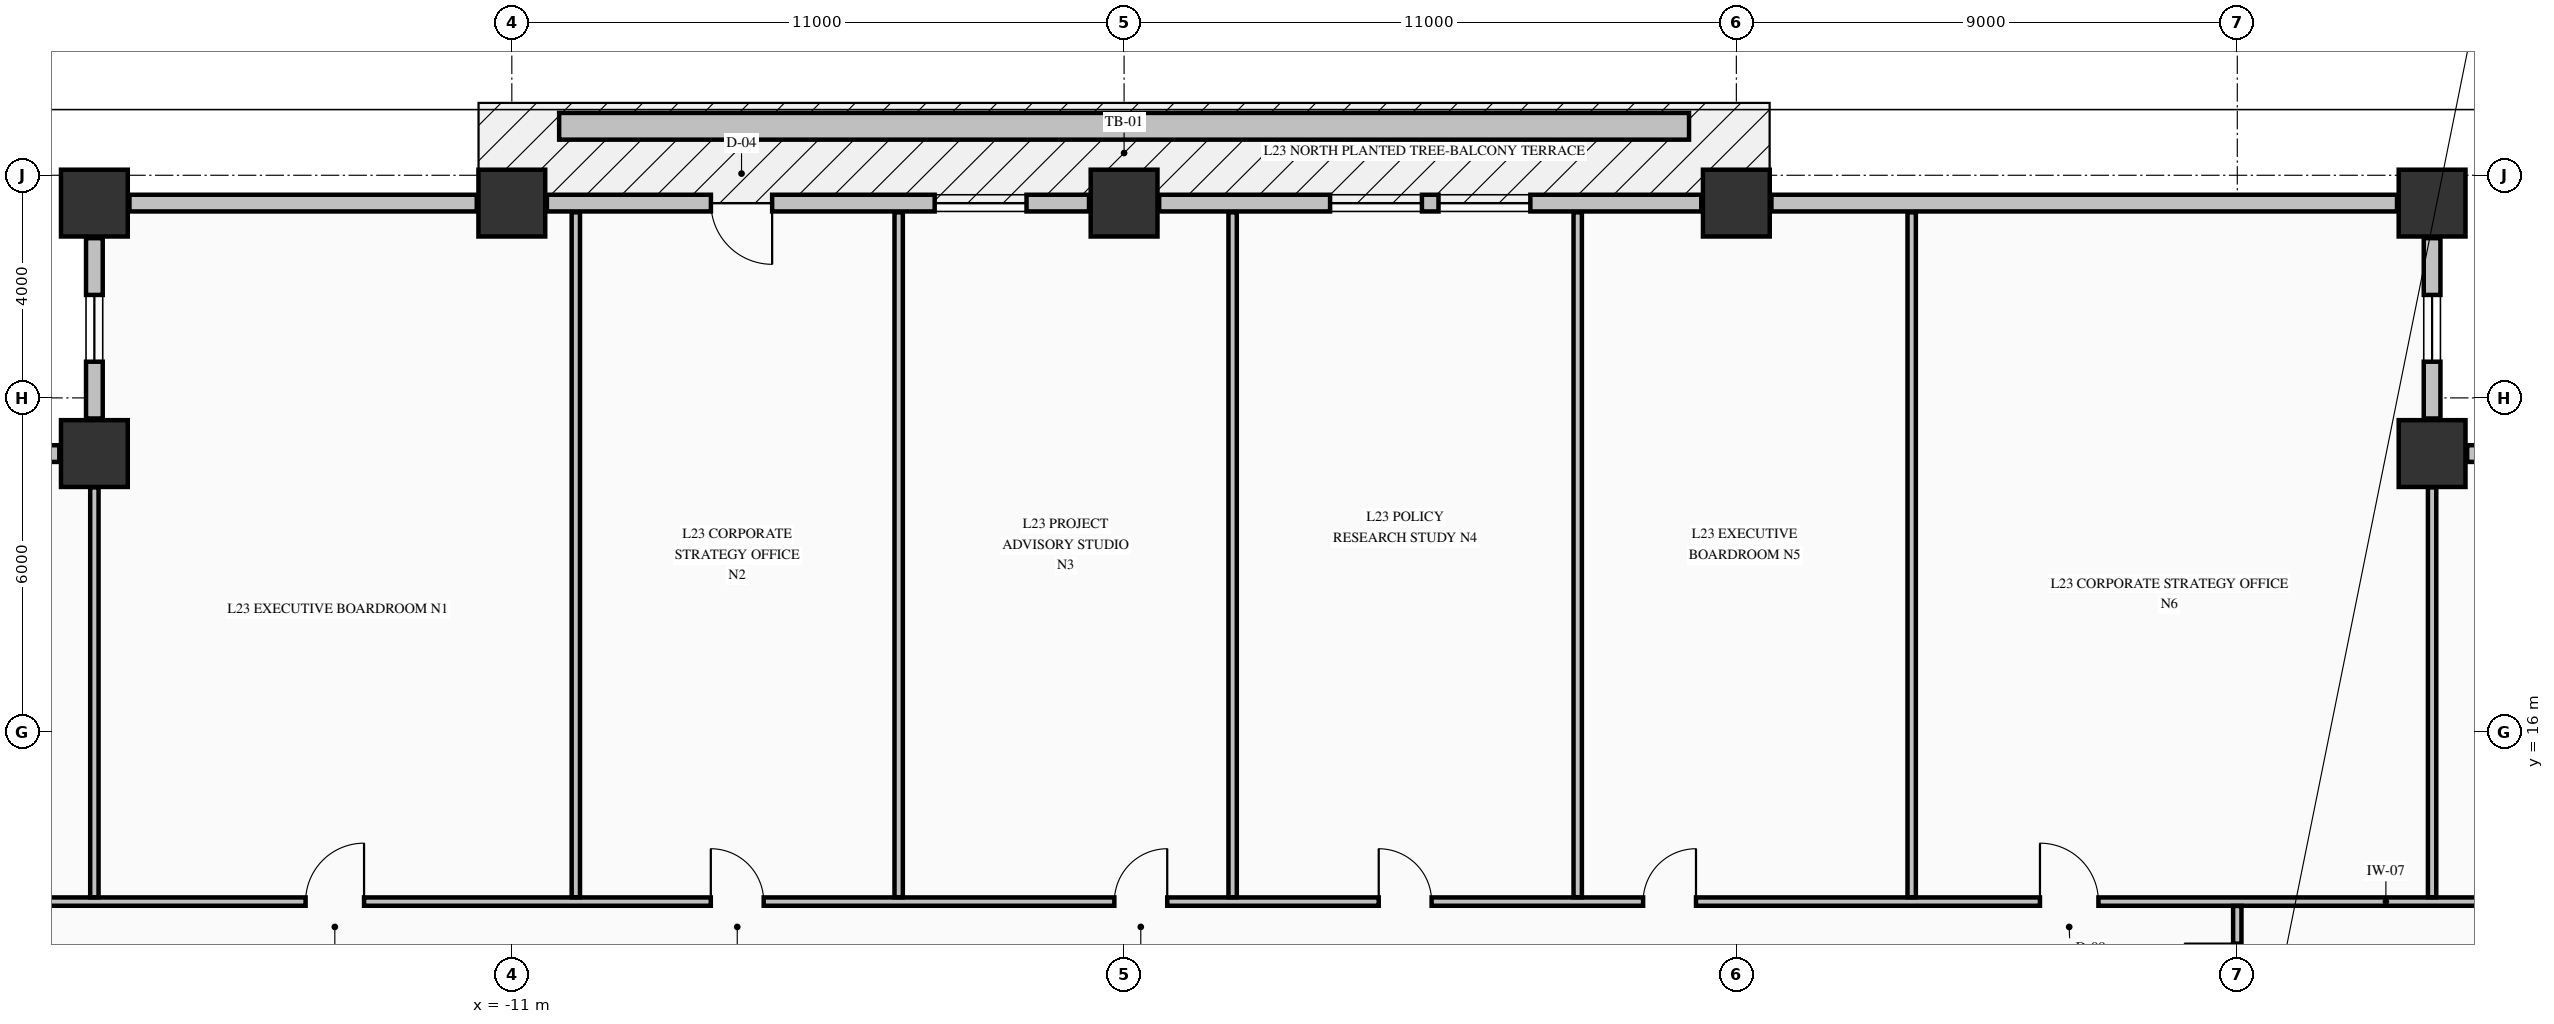
"""IFC4 building model, lengths in metres.
Left out: names, types, materials, properties, quantities, classifications, styles, units other than length and angle.
Written with IfcOpenShell. Run it as: python <this file> out.ifc"""

import sys

from ifc_helpers import new_model, si_unit, direction, frame, frame_2d, origin, origin_2d, place, context, subcontext, project, spatial, rectangle, extrude, element, fill, save


model = new_model("IFC4")
c1 = context("Model", 3, precision=1e-05, world=origin(), true_north=direction((0.0, 1.0)))
c2 = subcontext(c1, "Body", "Model", "MODEL_VIEW")
j1 = project(units=[si_unit("LENGTHUNIT", "METRE"), si_unit("PLANEANGLEUNIT", "RADIAN")], contexts=[c1])
p1 = place(None, origin())
s1 = spatial("IfcSite", under=j1, at=p1, CompositionType="ELEMENT")
p2 = place(p1, origin())
s2 = spatial("IfcBuilding", under=s1, at=p2, CompositionType="ELEMENT")
p3 = place(p2, frame((0.0, 0.0, 94.93)))
s3 = spatial("IfcBuildingStorey", under=s2, at=p3, CompositionType="ELEMENT", Elevation=94.93)
for number, where, z_axis, x_axis in (
    (1, (-18.5, 25.5, -0.25), (0.0, 0.0, 1.0), (1.0, 0.0, 0.0)),
    (2, (-11.0, 25.5, -0.25), (0.0, 0.0, 1.0), (1.0, 0.0, 0.0)),
    (3, (0.0, 25.5, -0.25), (0.0, 0.0, 1.0), (1.0, 0.0, 0.0)),
    (4, (11.0, 25.5, -0.25), (0.0, 0.0, 1.0), (1.0, 0.0, 0.0)),
    (5, (23.5, 25.5, -0.25), (0.0, 0.0, 1.0), (1.0, 0.0, 0.0)),
    (6, (23.5, 21.0, -0.25), (0.0, 0.0, 1.0), (1.0, 0.0, 0.0)),
    (7, (-18.5, 21.0, -0.25), (0.0, 0.0, 1.0), (1.0, 0.0, 0.0)),
):
    element("IfcColumn", number, at=place(p3, frame(where, z_axis=z_axis, x_axis=x_axis)), inside=s3, PredefinedType="COLUMN", context=c2, shape_type="SweptSolid", body=[
        extrude(rectangle(XDim=1.2, YDim=1.2, at=origin_2d()), origin(), (0.0, 0.0, 1.0), 3.545),
    ])
p4 = place(p3, frame((27.37, 21.0, 0.0), z_axis=(0.0, 0.0, 1.0), x_axis=(-1.0, 0.0, 0.0)))
e8 = element("IfcWall", 8, at=p4, inside=s3, PredefinedType="STANDARD", context=c2, shape_type="SweptSolid", body=[
    extrude(rectangle(XDim=3.24, YDim=0.3, at=frame_2d((1.62, 0.0))), origin(), (0.0, 0.0, 1.0), 2.687),
])
p5 = place(p4, frame((1.02, 0.0, 0.82)))
e9 = element("IfcOpeningElement", 9, at=p5, cuts=e8, PredefinedType="OPENING", context=c2, shape_type="SweptSolid", body=[
    extrude(rectangle(XDim=1.2, YDim=1.65, at=frame_2d((0.6, 0.825))), frame((0.0, 0.16, 0.0), z_axis=(0.0, -1.0, 0.0), x_axis=(1.0, 0.0, 0.0)), (0.0, 0.0, 1.0), 0.32),
])
p6 = place(p3, frame((23.5, 21.63, 0.0), z_axis=(0.0, 0.0, 1.0), x_axis=(0.0, 1.0, 0.0)))
e10 = element("IfcWall", 10, at=p6, inside=s3, PredefinedType="STANDARD", context=c2, shape_type="SweptSolid", body=[
    extrude(rectangle(XDim=3.24, YDim=0.3, at=frame_2d((1.62, 0.0))), origin(), (0.0, 0.0, 1.0), 2.687),
])
p7 = place(p6, frame((1.02, 0.0, 0.82)))
e11 = element("IfcOpeningElement", 11, at=p7, cuts=e10, PredefinedType="OPENING", context=c2, shape_type="SweptSolid", body=[
    extrude(rectangle(XDim=1.2, YDim=1.65, at=frame_2d((0.6, 0.825))), frame((0.0, 0.16, 0.0), z_axis=(0.0, -1.0, 0.0), x_axis=(1.0, 0.0, 0.0)), (0.0, 0.0, 1.0), 0.32),
])
p8 = place(p3, frame((-18.5, 24.87, 0.0), z_axis=(0.0, 0.0, 1.0), x_axis=(0.0, -1.0, 0.0)))
e12 = element("IfcWall", 12, at=p8, inside=s3, PredefinedType="STANDARD", context=c2, shape_type="SweptSolid", body=[
    extrude(rectangle(XDim=3.24, YDim=0.3, at=frame_2d((1.62, 0.0))), origin(), (0.0, 0.0, 1.0), 2.687),
])
p9 = place(p8, frame((1.02, 0.0, 0.82)))
e13 = element("IfcOpeningElement", 13, at=p9, cuts=e12, PredefinedType="OPENING", context=c2, shape_type="SweptSolid", body=[
    extrude(rectangle(XDim=1.2, YDim=1.65, at=frame_2d((0.6, 0.825))), frame((0.0, 0.16, 0.0), z_axis=(0.0, -1.0, 0.0), x_axis=(1.0, 0.0, 0.0)), (0.0, 0.0, 1.0), 0.32),
])
p10 = place(p3, frame((-19.13, 21.0, 0.0), z_axis=(0.0, 0.0, 1.0), x_axis=(-1.0, 0.0, 0.0)))
e14 = element("IfcWall", 14, at=p10, inside=s3, PredefinedType="STANDARD", context=c2, shape_type="SweptSolid", body=[
    extrude(rectangle(XDim=3.24, YDim=0.3, at=frame_2d((1.62, 0.0))), origin(), (0.0, 0.0, 1.0), 2.687),
])
p11 = place(p10, frame((1.02, 0.0, 0.82)))
e15 = element("IfcOpeningElement", 15, at=p11, cuts=e14, PredefinedType="OPENING", context=c2, shape_type="SweptSolid", body=[
    extrude(rectangle(XDim=1.2, YDim=1.65, at=frame_2d((0.6, 0.825))), frame((0.0, 0.16, 0.0), z_axis=(0.0, -1.0, 0.0), x_axis=(1.0, 0.0, 0.0)), (0.0, 0.0, 1.0), 0.32),
])
p12 = place(p3, frame((-11.63, 25.5, 0.0), z_axis=(0.0, 0.0, 1.0), x_axis=(-1.0, 0.0, 0.0)))
e16 = element("IfcWall", 16, at=p12, inside=s3, PredefinedType="STANDARD", context=c2, shape_type="SweptSolid", body=[
    extrude(rectangle(XDim=6.24, YDim=0.3, at=frame_2d((3.12, 0.0))), origin(), (0.0, 0.0, 1.0), 2.687),
])
p13 = place(p3, frame((-0.63, 25.5, 0.0), z_axis=(0.0, 0.0, 1.0), x_axis=(-1.0, 0.0, 0.0)))
e17 = element("IfcWall", 17, at=p13, inside=s3, PredefinedType="STANDARD", context=c2, shape_type="SweptSolid", body=[
    extrude(rectangle(XDim=9.74, YDim=0.3, at=frame_2d((4.87, 0.0))), origin(), (0.0, 0.0, 1.0), 2.687),
])
p14 = place(p13, frame((5.693, 0.0, 0.0)))
e18 = element("IfcOpeningElement", 18, at=p14, cuts=e17, PredefinedType="OPENING", context=c2, shape_type="SweptSolid", body=[
    extrude(rectangle(XDim=1.1, YDim=2.15, at=frame_2d((0.55, 1.075))), frame((0.0, 0.16, 0.0), z_axis=(0.0, -1.0, 0.0), x_axis=(1.0, 0.0, 0.0)), (0.0, 0.0, 1.0), 0.32),
])
p15 = place(p13, frame((1.123, 0.0, 0.8)))
e19 = element("IfcOpeningElement", 19, at=p15, cuts=e17, PredefinedType="OPENING", context=c2, shape_type="SweptSolid", body=[
    extrude(rectangle(XDim=1.65, YDim=1.7, at=frame_2d((0.825, 0.85))), frame((0.0, 0.16, 0.0), z_axis=(0.0, -1.0, 0.0), x_axis=(1.0, 0.0, 0.0)), (0.0, 0.0, 1.0), 0.32),
])
p16 = place(p3, frame((10.37, 25.5, 0.0), z_axis=(0.0, 0.0, 1.0), x_axis=(-1.0, 0.0, 0.0)))
e20 = element("IfcWall", 20, at=p16, inside=s3, PredefinedType="STANDARD", context=c2, shape_type="SweptSolid", body=[
    extrude(rectangle(XDim=9.74, YDim=0.3, at=frame_2d((4.87, 0.0))), origin(), (0.0, 0.0, 1.0), 2.687),
])
p17 = place(p16, frame((3.071, 0.0, 0.8)))
e21 = element("IfcOpeningElement", 21, at=p17, cuts=e20, PredefinedType="OPENING", context=c2, shape_type="SweptSolid", body=[
    extrude(rectangle(XDim=1.65, YDim=1.7, at=frame_2d((0.825, 0.85))), frame((0.0, 0.16, 0.0), z_axis=(0.0, -1.0, 0.0), x_axis=(1.0, 0.0, 0.0)), (0.0, 0.0, 1.0), 0.32),
])
p18 = place(p16, frame((5.019, 0.0, 0.8)))
e22 = element("IfcOpeningElement", 22, at=p18, cuts=e20, PredefinedType="OPENING", context=c2, shape_type="SweptSolid", body=[
    extrude(rectangle(XDim=1.65, YDim=1.7, at=frame_2d((0.825, 0.85))), frame((0.0, 0.16, 0.0), z_axis=(0.0, -1.0, 0.0), x_axis=(1.0, 0.0, 0.0)), (0.0, 0.0, 1.0), 0.32),
])
p19 = place(p3, frame((22.87, 25.5, 0.0), z_axis=(0.0, 0.0, 1.0), x_axis=(-1.0, 0.0, 0.0)))
e23 = element("IfcWall", 23, at=p19, inside=s3, PredefinedType="STANDARD", context=c2, shape_type="SweptSolid", body=[
    extrude(rectangle(XDim=11.24, YDim=0.3, at=frame_2d((5.62, 0.0))), origin(), (0.0, 0.0, 1.0), 2.687),
])
p20 = place(p3, frame((-22.835, 12.95, 0.0), z_axis=(0.0, 0.0, 1.0), x_axis=(1.0, 0.0, 0.0)))
e24 = element("IfcWall", 24, at=p20, inside=s3, PredefinedType="PARTITIONING", context=c2, shape_type="SweptSolid", body=[
    extrude(rectangle(XDim=50.67, YDim=0.15, at=frame_2d((25.335, 0.0))), origin(), (0.0, 0.0, 1.0), 3.295),
])
p21 = place(p20, frame((8.13, 0.0, 0.0)))
e25 = element("IfcOpeningElement", 25, at=p21, cuts=e24, PredefinedType="OPENING", context=c2, shape_type="SweptSolid", body=[
    extrude(rectangle(XDim=1.05, YDim=2.15, at=frame_2d((0.525, 1.075))), frame((0.0, 0.085, 0.0), z_axis=(0.0, -1.0, 0.0), x_axis=(1.0, 0.0, 0.0)), (0.0, 0.0, 1.0), 0.17),
])
p22 = place(p20, frame((15.41, 0.0, 0.0)))
e26 = element("IfcOpeningElement", 26, at=p22, cuts=e24, PredefinedType="OPENING", context=c2, shape_type="SweptSolid", body=[
    extrude(rectangle(XDim=0.95, YDim=2.15, at=frame_2d((0.475, 1.075))), frame((0.0, 0.085, 0.0), z_axis=(0.0, -1.0, 0.0), x_axis=(1.0, 0.0, 0.0)), (0.0, 0.0, 1.0), 0.17),
])
p23 = place(p20, frame((22.66, 0.0, 0.0)))
e27 = element("IfcOpeningElement", 27, at=p23, cuts=e24, PredefinedType="OPENING", context=c2, shape_type="SweptSolid", body=[
    extrude(rectangle(XDim=0.95, YDim=2.15, at=frame_2d((0.475, 1.075))), frame((0.0, 0.085, 0.0), z_axis=(0.0, -1.0, 0.0), x_axis=(1.0, 0.0, 0.0)), (0.0, 0.0, 1.0), 0.17),
])
p24 = place(p20, frame((27.41, 0.0, 0.0)))
e28 = element("IfcOpeningElement", 28, at=p24, cuts=e24, PredefinedType="OPENING", context=c2, shape_type="SweptSolid", body=[
    extrude(rectangle(XDim=0.95, YDim=2.15, at=frame_2d((0.475, 1.075))), frame((0.0, 0.085, 0.0), z_axis=(0.0, -1.0, 0.0), x_axis=(1.0, 0.0, 0.0)), (0.0, 0.0, 1.0), 0.17),
])
p25 = place(p20, frame((32.16, 0.0, 0.0)))
e29 = element("IfcOpeningElement", 29, at=p25, cuts=e24, PredefinedType="OPENING", context=c2, shape_type="SweptSolid", body=[
    extrude(rectangle(XDim=0.95, YDim=2.15, at=frame_2d((0.475, 1.075))), frame((0.0, 0.085, 0.0), z_axis=(0.0, -1.0, 0.0), x_axis=(1.0, 0.0, 0.0)), (0.0, 0.0, 1.0), 0.17),
])
p26 = place(p20, frame((39.29, 0.0, 0.0)))
e30 = element("IfcOpeningElement", 30, at=p26, cuts=e24, PredefinedType="OPENING", context=c2, shape_type="SweptSolid", body=[
    extrude(rectangle(XDim=1.05, YDim=2.15, at=frame_2d((0.525, 1.075))), frame((0.0, 0.085, 0.0), z_axis=(0.0, -1.0, 0.0), x_axis=(1.0, 0.0, 0.0)), (0.0, 0.0, 1.0), 0.17),
])
p27 = place(p3, frame((-18.5, 13.028, 0.0), z_axis=(0.0, 0.0, 1.0), x_axis=(0.0, 1.0, 0.0)))
e31 = element("IfcWall", 31, at=p27, inside=s3, PredefinedType="PARTITIONING", context=c2, shape_type="SweptSolid", body=[
    extrude(rectangle(XDim=7.366, YDim=0.15, at=frame_2d((3.683, 0.0))), origin(), (0.0, 0.0, 1.0), 3.295),
])
for number, where, z_axis, x_axis in (
    (32, (-9.85, 13.028, 0.0), (0.0, 0.0, 1.0), (0.0, 1.0, 0.0)),
    (33, (-4.05, 13.028, 0.0), (0.0, 0.0, 1.0), (0.0, 1.0, 0.0)),
    (34, (1.95, 13.028, 0.0), (0.0, 0.0, 1.0), (0.0, 1.0, 0.0)),
    (35, (8.15, 13.028, 0.0), (0.0, 0.0, 1.0), (0.0, 1.0, 0.0)),
    (36, (14.15, 13.028, 0.0), (0.0, 0.0, 1.0), (0.0, 1.0, 0.0)),
):
    element("IfcWall", number, at=place(p3, frame(where, z_axis=z_axis, x_axis=x_axis)), inside=s3, PredefinedType="PARTITIONING", context=c2, shape_type="SweptSolid", body=[
        extrude(rectangle(XDim=12.307, YDim=0.15, at=frame_2d((6.153, 0.0))), origin(), (0.0, 0.0, 1.0), 3.295),
    ])
p28 = place(p3, frame((20.0, 11.006, 0.0), z_axis=(0.0, 0.0, 1.0), x_axis=(0.0, 1.0, 0.0)))
e37 = element("IfcWall", 37, at=p28, inside=s3, PredefinedType="PARTITIONING", context=c2, shape_type="SweptSolid", body=[
    extrude(rectangle(XDim=1.866, YDim=0.15, at=frame_2d((0.933, 0.0))), origin(), (0.0, 0.0, 1.0), 2.785),
])
p29 = place(p28, frame((0.239, 0.0, 0.0)))
e38 = element("IfcOpeningElement", 38, at=p29, cuts=e37, PredefinedType="OPENING", context=c2, shape_type="SweptSolid", body=[
    extrude(rectangle(XDim=0.95, YDim=2.15, at=frame_2d((0.475, 1.075))), frame((0.0, 0.085, 0.0), z_axis=(0.0, -1.0, 0.0), x_axis=(1.0, 0.0, 0.0)), (0.0, 0.0, 1.0), 0.17),
])
p30 = place(p3, frame((23.5, 13.028, 0.0), z_axis=(0.0, 0.0, 1.0), x_axis=(0.0, 1.0, 0.0)))
e39 = element("IfcWall", 39, at=p30, inside=s3, PredefinedType="PARTITIONING", context=c2, shape_type="SweptSolid", body=[
    extrude(rectangle(XDim=7.366, YDim=0.15, at=frame_2d((3.683, 0.0))), origin(), (0.0, 0.0, 1.0), 3.295),
])
p31 = place(p3, frame((-10.15, 26.88, -0.04), z_axis=(0.0, 0.0, 1.0), x_axis=(1.0, 0.0, 0.0)))
e40 = element("IfcWall", 40, at=p31, inside=s3, PredefinedType="PARAPET", context=c2, shape_type="SweptSolid", body=[
    extrude(rectangle(XDim=20.3, YDim=0.48, at=frame_2d((10.15, 0.0))), origin(), (0.0, 0.0, 1.0), 0.52),
])
p32 = place(p7, origin())
e41 = element("IfcWindow", 41, at=p32, inside=s3, PartitioningType="SINGLE_PANEL", PredefinedType="WINDOW", context=c2, shape_type="SweptSolid", body=[
    extrude(rectangle(XDim=1.2, YDim=1.65, at=frame_2d((0.6, 0.825))), frame((0.0, 0.03, 0.0), z_axis=(0.0, -1.0, 0.0), x_axis=(1.0, 0.0, 0.0)), (0.0, 0.0, 1.0), 0.06),
])
fill(e11, e41)
p33 = place(p9, origin())
e42 = element("IfcWindow", 42, at=p33, inside=s3, PartitioningType="SINGLE_PANEL", PredefinedType="WINDOW", context=c2, shape_type="SweptSolid", body=[
    extrude(rectangle(XDim=1.2, YDim=1.65, at=frame_2d((0.6, 0.825))), frame((0.0, 0.03, 0.0), z_axis=(0.0, -1.0, 0.0), x_axis=(1.0, 0.0, 0.0)), (0.0, 0.0, 1.0), 0.06),
])
fill(e13, e42)
p34 = place(p14, origin())
e43 = element("IfcDoor", 43, at=p34, inside=s3, OperationType="SINGLE_SWING_LEFT", PredefinedType="DOOR", context=c2, shape_type="SweptSolid", body=[
    extrude(rectangle(XDim=1.1, YDim=2.15, at=frame_2d((0.55, 1.075))), frame((0.0, 0.025, 0.0), z_axis=(0.0, -1.0, 0.0), x_axis=(1.0, 0.0, 0.0)), (0.0, 0.0, 1.0), 0.05),
])
fill(e18, e43)
p35 = place(p15, origin())
e44 = element("IfcWindow", 44, at=p35, inside=s3, PartitioningType="SINGLE_PANEL", PredefinedType="WINDOW", context=c2, shape_type="SweptSolid", body=[
    extrude(rectangle(XDim=1.65, YDim=1.7, at=frame_2d((0.825, 0.85))), frame((0.0, 0.03, 0.0), z_axis=(0.0, -1.0, 0.0), x_axis=(1.0, 0.0, 0.0)), (0.0, 0.0, 1.0), 0.06),
])
fill(e19, e44)
p36 = place(p17, origin())
e45 = element("IfcWindow", 45, at=p36, inside=s3, PartitioningType="SINGLE_PANEL", PredefinedType="WINDOW", context=c2, shape_type="SweptSolid", body=[
    extrude(rectangle(XDim=1.65, YDim=1.7, at=frame_2d((0.825, 0.85))), frame((0.0, 0.03, 0.0), z_axis=(0.0, -1.0, 0.0), x_axis=(1.0, 0.0, 0.0)), (0.0, 0.0, 1.0), 0.06),
])
fill(e21, e45)
p37 = place(p18, origin())
e46 = element("IfcWindow", 46, at=p37, inside=s3, PartitioningType="SINGLE_PANEL", PredefinedType="WINDOW", context=c2, shape_type="SweptSolid", body=[
    extrude(rectangle(XDim=1.65, YDim=1.7, at=frame_2d((0.825, 0.85))), frame((0.0, 0.03, 0.0), z_axis=(0.0, -1.0, 0.0), x_axis=(1.0, 0.0, 0.0)), (0.0, 0.0, 1.0), 0.06),
])
fill(e22, e46)
p38 = place(p21, origin())
e47 = element("IfcDoor", 47, at=p38, inside=s3, OperationType="SINGLE_SWING_RIGHT", PredefinedType="DOOR", context=c2, shape_type="SweptSolid", body=[
    extrude(rectangle(XDim=1.05, YDim=2.15, at=frame_2d((0.525, 1.075))), frame((0.0, 0.025, 0.0), z_axis=(0.0, -1.0, 0.0), x_axis=(1.0, 0.0, 0.0)), (0.0, 0.0, 1.0), 0.05),
])
fill(e25, e47)
p39 = place(p22, origin())
e48 = element("IfcDoor", 48, at=p39, inside=s3, OperationType="SINGLE_SWING_LEFT", PredefinedType="DOOR", context=c2, shape_type="SweptSolid", body=[
    extrude(rectangle(XDim=0.95, YDim=2.15, at=frame_2d((0.475, 1.075))), frame((0.0, 0.025, 0.0), z_axis=(0.0, -1.0, 0.0), x_axis=(1.0, 0.0, 0.0)), (0.0, 0.0, 1.0), 0.05),
])
fill(e26, e48)
p40 = place(p23, origin())
e49 = element("IfcDoor", 49, at=p40, inside=s3, OperationType="SINGLE_SWING_RIGHT", PredefinedType="DOOR", context=c2, shape_type="SweptSolid", body=[
    extrude(rectangle(XDim=0.95, YDim=2.15, at=frame_2d((0.475, 1.075))), frame((0.0, 0.025, 0.0), z_axis=(0.0, -1.0, 0.0), x_axis=(1.0, 0.0, 0.0)), (0.0, 0.0, 1.0), 0.05),
])
fill(e27, e49)
p41 = place(p24, origin())
e50 = element("IfcDoor", 50, at=p41, inside=s3, OperationType="SINGLE_SWING_LEFT", PredefinedType="DOOR", context=c2, shape_type="SweptSolid", body=[
    extrude(rectangle(XDim=0.95, YDim=2.15, at=frame_2d((0.475, 1.075))), frame((0.0, 0.025, 0.0), z_axis=(0.0, -1.0, 0.0), x_axis=(1.0, 0.0, 0.0)), (0.0, 0.0, 1.0), 0.05),
])
fill(e28, e50)
p42 = place(p25, origin())
e51 = element("IfcDoor", 51, at=p42, inside=s3, OperationType="SINGLE_SWING_RIGHT", PredefinedType="DOOR", context=c2, shape_type="SweptSolid", body=[
    extrude(rectangle(XDim=0.95, YDim=2.15, at=frame_2d((0.475, 1.075))), frame((0.0, 0.025, 0.0), z_axis=(0.0, -1.0, 0.0), x_axis=(1.0, 0.0, 0.0)), (0.0, 0.0, 1.0), 0.05),
])
fill(e29, e51)
p43 = place(p26, origin())
e52 = element("IfcDoor", 52, at=p43, inside=s3, OperationType="SINGLE_SWING_LEFT", PredefinedType="DOOR", context=c2, shape_type="SweptSolid", body=[
    extrude(rectangle(XDim=1.05, YDim=2.15, at=frame_2d((0.525, 1.075))), frame((0.0, 0.025, 0.0), z_axis=(0.0, -1.0, 0.0), x_axis=(1.0, 0.0, 0.0)), (0.0, 0.0, 1.0), 0.05),
])
fill(e30, e52)
p44 = place(p29, origin())
e53 = element("IfcDoor", 53, at=p44, inside=s3, OperationType="SINGLE_SWING_RIGHT", PredefinedType="DOOR", context=c2, shape_type="SweptSolid", body=[
    extrude(rectangle(XDim=0.95, YDim=2.15, at=frame_2d((0.475, 1.075))), frame((0.0, 0.025, 0.0), z_axis=(0.0, -1.0, 0.0), x_axis=(1.0, 0.0, 0.0)), (0.0, 0.0, 1.0), 0.05),
])
fill(e38, e53)
save(model, sys.argv[1])
